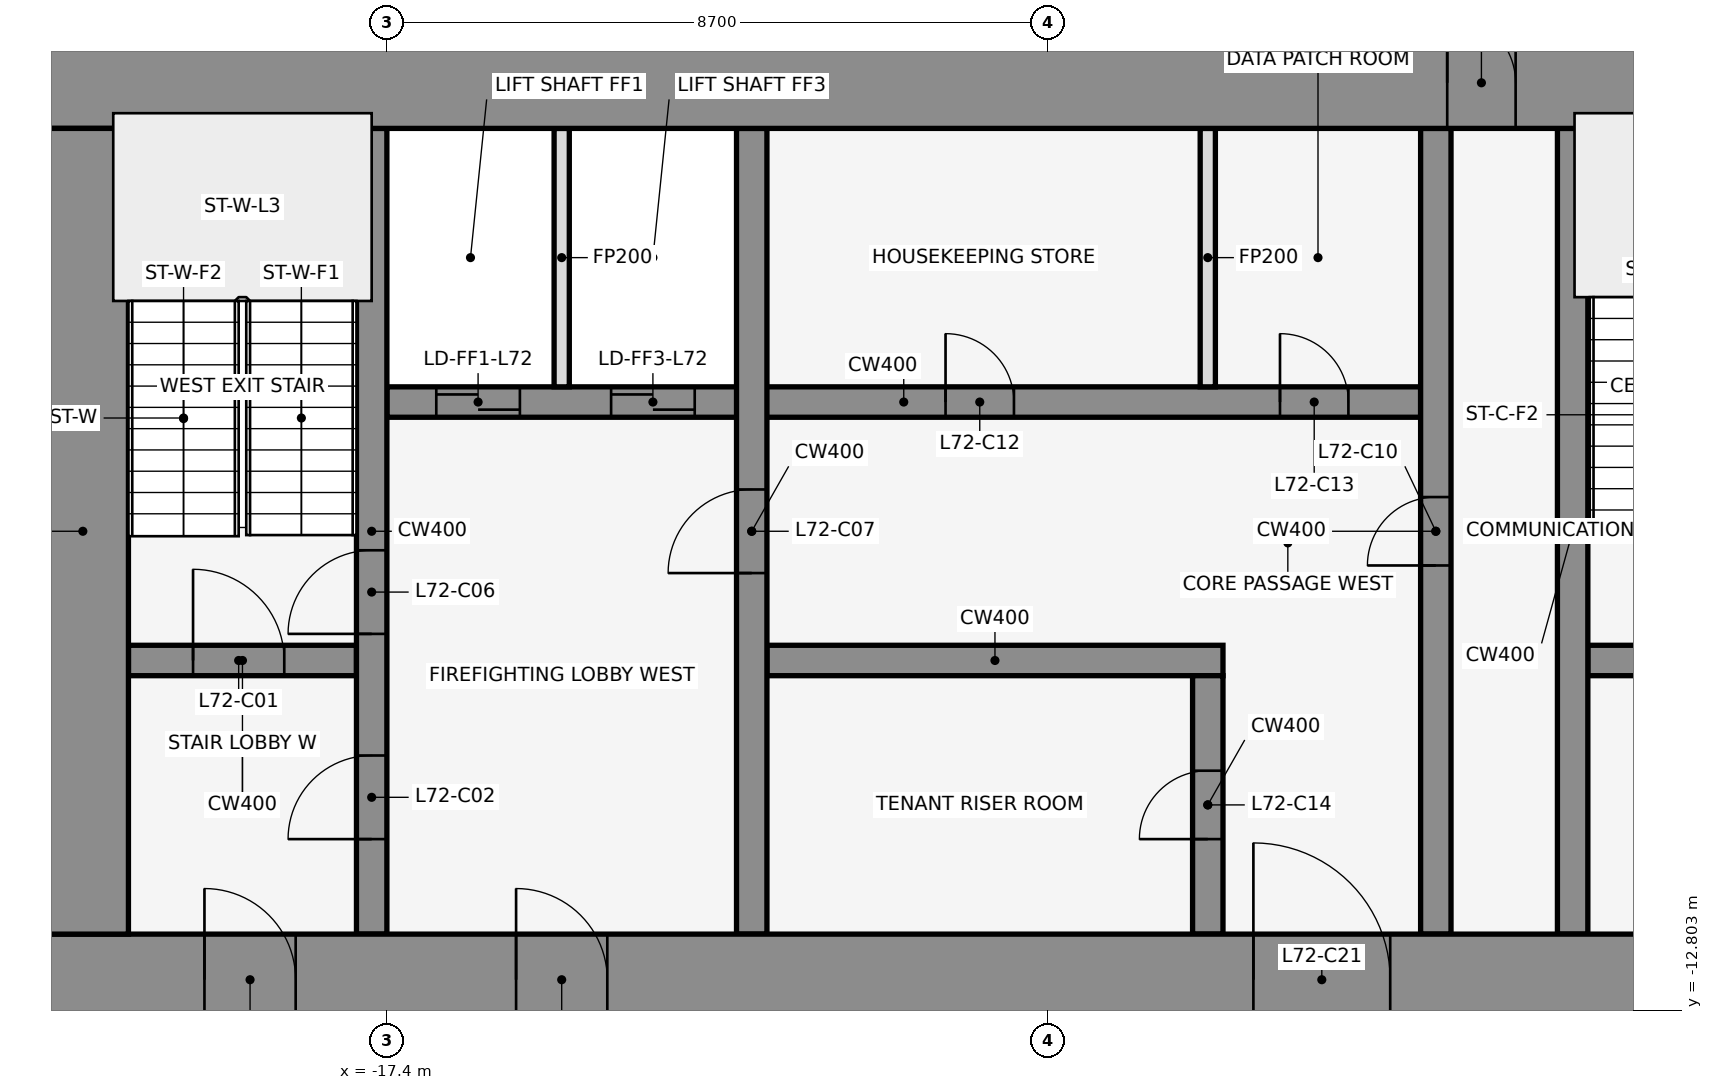
"""IFC4 building model, lengths in metres.
Left out: names, types, materials, properties, quantities, classifications, styles, units other than length and angle.
Written with IfcOpenShell. Run it as: python <this file> out.ifc"""

import sys

from ifc_helpers import new_model, si_unit, direction, frame, frame_2d, origin, place, context, subcontext, project, spatial, rectangle, extrude, element, fill, save


model = new_model("IFC4")
c1 = context("Model", 3, precision=1e-05, world=origin(), true_north=direction((0.0, 1.0)))
c2 = subcontext(c1, "Body", "Model", "MODEL_VIEW")
j1 = project(units=[si_unit("LENGTHUNIT", "METRE"), si_unit("PLANEANGLEUNIT", "RADIAN")], contexts=[c1])
p1 = place(None, origin())
s1 = spatial("IfcSite", under=j1, at=p1, CompositionType="ELEMENT")
p2 = place(p1, origin())
s2 = spatial("IfcBuilding", under=s1, at=p2, CompositionType="ELEMENT")
p3 = place(p2, frame((0.0, 0.0, 320.0)))
s3 = spatial("IfcBuildingStorey", under=s2, at=p3, CompositionType="ELEMENT", Elevation=320.0)
for number, where, z_axis, x_axis in (
    (1, (-0.068, -0.105, 0.0), (0.0, 0.0, 1.0), (-0.84, 0.543, 0.0)),
    (2, (-14.599, 1.08, 0.0), (0.0, 0.0, 1.0), (-0.84, -0.543, 0.0)),
):
    element("IfcWall", number, at=place(p3, frame(where, z_axis=z_axis, x_axis=x_axis)), inside=s3, PredefinedType="STANDARD", context=c2, shape_type="SweptSolid", body=[
        extrude(rectangle(XDim=2.183, YDim=0.25, at=frame_2d((1.091, 0.0))), origin(), (0.0, 0.0, 1.0), 4.35),
    ])
p4 = place(p3, frame((-20.8, -8.2, 0.0), z_axis=(0.0, 0.0, 1.0), x_axis=(1.0, 0.0, 0.0)))
e3 = element("IfcWall", 3, at=p4, inside=s3, PredefinedType="SHEAR", context=c2, shape_type="SweptSolid", body=[
    extrude(rectangle(XDim=3.0, YDim=0.4, at=frame_2d((1.5, 0.0))), origin(), (0.0, 0.0, 1.0), 4.5),
])
p5 = place(p4, frame((0.85, 0.0, 0.0)))
e4 = element("IfcOpeningElement", 4, at=p5, cuts=e3, PredefinedType="OPENING", context=c2, shape_type="SweptSolid", body=[
    extrude(rectangle(XDim=1.2, YDim=2.1, at=frame_2d((0.6, 1.05))), frame((0.0, 0.212, 0.0), z_axis=(0.0, -1.0, 0.0), x_axis=(1.0, 0.0, 0.0)), (0.0, 0.0, 1.0), 0.424),
])
p6 = place(p3, frame((-12.4, -8.2, 0.0), z_axis=(0.0, 0.0, 1.0), x_axis=(1.0, 0.0, 0.0)))
e5 = element("IfcWall", 5, at=p6, inside=s3, PredefinedType="SHEAR", context=c2, shape_type="SweptSolid", body=[
    extrude(rectangle(XDim=6.0, YDim=0.4, at=frame_2d((3.0, 0.0))), origin(), (0.0, 0.0, 1.0), 4.5),
])
p7 = place(p3, frame((-1.6, -8.2, 0.0), z_axis=(0.0, 0.0, 1.0), x_axis=(1.0, 0.0, 0.0)))
e6 = element("IfcWall", 6, at=p7, inside=s3, PredefinedType="SHEAR", context=c2, shape_type="SweptSolid", body=[
    extrude(rectangle(XDim=3.2, YDim=0.4, at=frame_2d((1.6, 0.0))), origin(), (0.0, 0.0, 1.0), 4.5),
])
p8 = place(p7, frame((1.05, 0.0, 0.0)))
e7 = element("IfcOpeningElement", 7, at=p8, cuts=e6, PredefinedType="OPENING", context=c2, shape_type="SweptSolid", body=[
    extrude(rectangle(XDim=1.2, YDim=2.1, at=frame_2d((0.6, 1.05))), frame((0.0, 0.212, 0.0), z_axis=(0.0, -1.0, 0.0), x_axis=(1.0, 0.0, 0.0)), (0.0, 0.0, 1.0), 0.424),
])
p9 = place(p3, frame((-17.4, -4.8, 0.0), z_axis=(0.0, 0.0, 1.0), x_axis=(1.0, 0.0, 0.0)))
e8 = element("IfcWall", 8, at=p9, inside=s3, PredefinedType="SHEAR", context=c2, shape_type="SweptSolid", body=[
    extrude(rectangle(XDim=13.6, YDim=0.4, at=frame_2d((6.8, 0.0))), origin(), (0.0, 0.0, 1.0), 4.5),
])
p10 = place(p9, frame((0.65, 0.0, 0.0)))
e9 = element("IfcOpeningElement", 9, at=p10, cuts=e8, PredefinedType="OPENING", context=c2, shape_type="SweptSolid", body=[
    extrude(rectangle(XDim=1.1, YDim=2.1, at=frame_2d((0.55, 1.05))), frame((0.0, 0.212, 0.0), z_axis=(0.0, -1.0, 0.0), x_axis=(1.0, 0.0, 0.0)), (0.0, 0.0, 1.0), 0.424),
])
p11 = place(p9, frame((2.95, 0.0, 0.0)))
e10 = element("IfcOpeningElement", 10, at=p11, cuts=e8, PredefinedType="OPENING", context=c2, shape_type="SweptSolid", body=[
    extrude(rectangle(XDim=1.1, YDim=2.1, at=frame_2d((0.55, 1.05))), frame((0.0, 0.212, 0.0), z_axis=(0.0, -1.0, 0.0), x_axis=(1.0, 0.0, 0.0)), (0.0, 0.0, 1.0), 0.424),
])
p12 = place(p9, frame((7.35, 0.0, 0.0)))
e11 = element("IfcOpeningElement", 11, at=p12, cuts=e8, PredefinedType="OPENING", context=c2, shape_type="SweptSolid", body=[
    extrude(rectangle(XDim=0.9, YDim=2.1, at=frame_2d((0.45, 1.05))), frame((0.0, 0.212, 0.0), z_axis=(0.0, -1.0, 0.0), x_axis=(1.0, 0.0, 0.0)), (0.0, 0.0, 1.0), 0.424),
])
p13 = place(p9, frame((11.75, 0.0, 0.0)))
e12 = element("IfcOpeningElement", 12, at=p13, cuts=e8, PredefinedType="OPENING", context=c2, shape_type="SweptSolid", body=[
    extrude(rectangle(XDim=0.9, YDim=2.1, at=frame_2d((0.45, 1.05))), frame((0.0, 0.212, 0.0), z_axis=(0.0, -1.0, 0.0), x_axis=(1.0, 0.0, 0.0)), (0.0, 0.0, 1.0), 0.424),
])
p14 = place(p3, frame((-17.6, -11.8, 0.0), z_axis=(0.0, 0.0, 1.0), x_axis=(0.0, 1.0, 0.0)))
e13 = element("IfcWall", 13, at=p14, inside=s3, PredefinedType="SHEAR", context=c2, shape_type="SweptSolid", body=[
    extrude(rectangle(XDim=10.6, YDim=0.4, at=frame_2d((5.3, 0.0))), origin(), (0.0, 0.0, 1.0), 4.5),
])
p15 = place(p14, frame((1.25, 0.0, 0.0)))
e14 = element("IfcOpeningElement", 14, at=p15, cuts=e13, PredefinedType="OPENING", context=c2, shape_type="SweptSolid", body=[
    extrude(rectangle(XDim=1.1, YDim=2.1, at=frame_2d((0.55, 1.05))), frame((0.0, 0.212, 0.0), z_axis=(0.0, -1.0, 0.0), x_axis=(1.0, 0.0, 0.0)), (0.0, 0.0, 1.0), 0.424),
])
p16 = place(p14, frame((3.95, 0.0, 0.0)))
e15 = element("IfcOpeningElement", 15, at=p16, cuts=e13, PredefinedType="OPENING", context=c2, shape_type="SweptSolid", body=[
    extrude(rectangle(XDim=1.1, YDim=2.1, at=frame_2d((0.55, 1.05))), frame((0.0, 0.212, 0.0), z_axis=(0.0, -1.0, 0.0), x_axis=(1.0, 0.0, 0.0)), (0.0, 0.0, 1.0), 0.424),
])
p17 = place(p3, frame((-15.1, -4.6, 0.0), z_axis=(0.0, 0.0, 1.0), x_axis=(0.0, 1.0, 0.0)))
e16 = element("IfcWall", 16, at=p17, inside=s3, PredefinedType="PARTITIONING", context=c2, shape_type="SweptSolid", body=[
    extrude(rectangle(XDim=3.4, YDim=0.2, at=frame_2d((1.7, 0.0))), origin(), (0.0, 0.0, 1.0), 3.418),
])
p18 = place(p3, frame((-12.6, -11.8, 0.0), z_axis=(0.0, 0.0, 1.0), x_axis=(0.0, 1.0, 0.0)))
e17 = element("IfcWall", 17, at=p18, inside=s3, PredefinedType="SHEAR", context=c2, shape_type="SweptSolid", body=[
    extrude(rectangle(XDim=10.6, YDim=0.4, at=frame_2d((5.3, 0.0))), origin(), (0.0, 0.0, 1.0), 4.5),
])
p19 = place(p18, frame((4.75, 0.0, 0.0)))
e18 = element("IfcOpeningElement", 18, at=p19, cuts=e17, PredefinedType="OPENING", context=c2, shape_type="SweptSolid", body=[
    extrude(rectangle(XDim=1.1, YDim=2.1, at=frame_2d((0.55, 1.05))), frame((0.0, 0.212, 0.0), z_axis=(0.0, -1.0, 0.0), x_axis=(1.0, 0.0, 0.0)), (0.0, 0.0, 1.0), 0.424),
])
p20 = place(p3, frame((-6.6, -11.8, 0.0), z_axis=(0.0, 0.0, 1.0), x_axis=(0.0, 1.0, 0.0)))
e19 = element("IfcWall", 19, at=p20, inside=s3, PredefinedType="SHEAR", context=c2, shape_type="SweptSolid", body=[
    extrude(rectangle(XDim=3.4, YDim=0.4, at=frame_2d((1.7, 0.0))), origin(), (0.0, 0.0, 1.0), 4.5),
])
p21 = place(p20, frame((1.25, 0.0, 0.0)))
e20 = element("IfcOpeningElement", 20, at=p21, cuts=e19, PredefinedType="OPENING", context=c2, shape_type="SweptSolid", body=[
    extrude(rectangle(XDim=0.9, YDim=2.1, at=frame_2d((0.45, 1.05))), frame((0.0, 0.212, 0.0), z_axis=(0.0, -1.0, 0.0), x_axis=(1.0, 0.0, 0.0)), (0.0, 0.0, 1.0), 0.424),
])
p22 = place(p3, frame((-6.6, -4.6, 0.0), z_axis=(0.0, 0.0, 1.0), x_axis=(0.0, 1.0, 0.0)))
e21 = element("IfcWall", 21, at=p22, inside=s3, PredefinedType="PARTITIONING", context=c2, shape_type="SweptSolid", body=[
    extrude(rectangle(XDim=3.4, YDim=0.2, at=frame_2d((1.7, 0.0))), origin(), (0.0, 0.0, 1.0), 3.418),
])
p23 = place(p3, frame((-3.6, -11.8, 0.0), z_axis=(0.0, 0.0, 1.0), x_axis=(0.0, 1.0, 0.0)))
e22 = element("IfcWall", 22, at=p23, inside=s3, PredefinedType="SHEAR", context=c2, shape_type="SweptSolid", body=[
    extrude(rectangle(XDim=10.6, YDim=0.4, at=frame_2d((5.3, 0.0))), origin(), (0.0, 0.0, 1.0), 4.5),
])
p24 = place(p23, frame((4.85, 0.0, 0.0)))
e23 = element("IfcOpeningElement", 23, at=p24, cuts=e22, PredefinedType="OPENING", context=c2, shape_type="SweptSolid", body=[
    extrude(rectangle(XDim=0.9, YDim=2.1, at=frame_2d((0.45, 1.05))), frame((0.0, 0.212, 0.0), z_axis=(0.0, -1.0, 0.0), x_axis=(1.0, 0.0, 0.0)), (0.0, 0.0, 1.0), 0.424),
])
p25 = place(p3, frame((-1.8, -11.8, 0.0), z_axis=(0.0, 0.0, 1.0), x_axis=(0.0, 1.0, 0.0)))
e24 = element("IfcWall", 24, at=p25, inside=s3, PredefinedType="SHEAR", context=c2, shape_type="SweptSolid", body=[
    extrude(rectangle(XDim=10.6, YDim=0.4, at=frame_2d((5.3, 0.0))), origin(), (0.0, 0.0, 1.0), 4.5),
])
p26 = place(p3, frame((-22.0, -0.6, 0.0), z_axis=(0.0, 0.0, 1.0), x_axis=(1.0, 0.0, 0.0)))
e25 = element("IfcWall", 25, at=p26, inside=s3, PredefinedType="SHEAR", context=c2, shape_type="SweptSolid", body=[
    extrude(rectangle(XDim=44.0, YDim=1.2, at=frame_2d((22.0, 0.0))), origin(), (0.0, 0.0, 1.0), 4.5),
])
p27 = place(p26, frame((18.55, 0.0, 0.0)))
e26 = element("IfcOpeningElement", 26, at=p27, cuts=e25, PredefinedType="OPENING", context=c2, shape_type="SweptSolid", body=[
    extrude(rectangle(XDim=0.9, YDim=2.1, at=frame_2d((0.45, 1.05))), frame((0.0, 0.612, 0.0), z_axis=(0.0, -1.0, 0.0), x_axis=(1.0, 0.0, 0.0)), (0.0, 0.0, 1.0), 1.224),
])
p28 = place(p26, frame((24.55, 0.0, 0.0)))
e27 = element("IfcOpeningElement", 27, at=p28, cuts=e25, PredefinedType="OPENING", context=c2, shape_type="SweptSolid", body=[
    extrude(rectangle(XDim=0.9, YDim=2.1, at=frame_2d((0.45, 1.05))), frame((0.0, 0.612, 0.0), z_axis=(0.0, -1.0, 0.0), x_axis=(1.0, 0.0, 0.0)), (0.0, 0.0, 1.0), 1.224),
])
p29 = place(p3, frame((-22.0, -12.4, 0.0), z_axis=(0.0, 0.0, 1.0), x_axis=(1.0, 0.0, 0.0)))
e28 = element("IfcWall", 28, at=p29, inside=s3, PredefinedType="SHEAR", context=c2, shape_type="SweptSolid", body=[
    extrude(rectangle(XDim=44.0, YDim=1.2, at=frame_2d((22.0, 0.0))), origin(), (0.0, 0.0, 1.0), 4.5),
])
p30 = place(p29, frame((2.2, 0.0, 0.0)))
e29 = element("IfcOpeningElement", 29, at=p30, cuts=e28, PredefinedType="OPENING", context=c2, shape_type="SweptSolid", body=[
    extrude(rectangle(XDim=1.2, YDim=2.1, at=frame_2d((0.6, 1.05))), frame((0.0, 0.612, 0.0), z_axis=(0.0, -1.0, 0.0), x_axis=(1.0, 0.0, 0.0)), (0.0, 0.0, 1.0), 1.224),
])
p31 = place(p29, frame((21.4, 0.0, 0.0)))
e30 = element("IfcOpeningElement", 30, at=p31, cuts=e28, PredefinedType="OPENING", context=c2, shape_type="SweptSolid", body=[
    extrude(rectangle(XDim=1.2, YDim=2.1, at=frame_2d((0.6, 1.05))), frame((0.0, 0.612, 0.0), z_axis=(0.0, -1.0, 0.0), x_axis=(1.0, 0.0, 0.0)), (0.0, 0.0, 1.0), 1.224),
])
p32 = place(p29, frame((40.6, 0.0, 0.0)))
e31 = element("IfcOpeningElement", 31, at=p32, cuts=e28, PredefinedType="OPENING", context=c2, shape_type="SweptSolid", body=[
    extrude(rectangle(XDim=1.2, YDim=2.1, at=frame_2d((0.6, 1.05))), frame((0.0, 0.612, 0.0), z_axis=(0.0, -1.0, 0.0), x_axis=(1.0, 0.0, 0.0)), (0.0, 0.0, 1.0), 1.224),
])
p33 = place(p29, frame((16.0, 0.0, 0.0)))
e32 = element("IfcOpeningElement", 32, at=p33, cuts=e28, PredefinedType="OPENING", context=c2, shape_type="SweptSolid", body=[
    extrude(rectangle(XDim=1.8, YDim=2.1, at=frame_2d((0.9, 1.05))), frame((0.0, 0.612, 0.0), z_axis=(0.0, -1.0, 0.0), x_axis=(1.0, 0.0, 0.0)), (0.0, 0.0, 1.0), 1.224),
])
p34 = place(p29, frame((6.3, 0.0, 0.0)))
e33 = element("IfcOpeningElement", 33, at=p34, cuts=e28, PredefinedType="OPENING", context=c2, shape_type="SweptSolid", body=[
    extrude(rectangle(XDim=1.2, YDim=2.1, at=frame_2d((0.6, 1.05))), frame((0.0, 0.612, 0.0), z_axis=(0.0, -1.0, 0.0), x_axis=(1.0, 0.0, 0.0)), (0.0, 0.0, 1.0), 1.224),
])
p35 = place(p29, frame((26.2, 0.0, 0.0)))
e34 = element("IfcOpeningElement", 34, at=p35, cuts=e28, PredefinedType="OPENING", context=c2, shape_type="SweptSolid", body=[
    extrude(rectangle(XDim=1.8, YDim=2.1, at=frame_2d((0.9, 1.05))), frame((0.0, 0.612, 0.0), z_axis=(0.0, -1.0, 0.0), x_axis=(1.0, 0.0, 0.0)), (0.0, 0.0, 1.0), 1.224),
])
p36 = place(p29, frame((36.5, 0.0, 0.0)))
e35 = element("IfcOpeningElement", 35, at=p36, cuts=e28, PredefinedType="OPENING", context=c2, shape_type="SweptSolid", body=[
    extrude(rectangle(XDim=1.2, YDim=2.1, at=frame_2d((0.6, 1.05))), frame((0.0, 0.612, 0.0), z_axis=(0.0, -1.0, 0.0), x_axis=(1.0, 0.0, 0.0)), (0.0, 0.0, 1.0), 1.224),
])
p37 = place(p3, frame((-21.4, -11.8, 0.0), z_axis=(0.0, 0.0, 1.0), x_axis=(0.0, 1.0, 0.0)))
e36 = element("IfcWall", 36, at=p37, inside=s3, PredefinedType="SHEAR", context=c2, shape_type="SweptSolid", body=[
    extrude(rectangle(XDim=10.6, YDim=1.2, at=frame_2d((5.3, 0.0))), origin(), (0.0, 0.0, 1.0), 4.5),
])
p38 = place(p5, origin())
e37 = element("IfcDoor", 37, at=p38, inside=s3, OperationType="SINGLE_SWING_LEFT", PredefinedType="DOOR", context=c2, shape_type="SweptSolid", body=[
    extrude(rectangle(XDim=1.2, YDim=2.1, at=frame_2d((0.6, 1.05))), frame((0.0, 0.025, 0.0), z_axis=(0.0, -1.0, 0.0), x_axis=(1.0, 0.0, 0.0)), (0.0, 0.0, 1.0), 0.05),
])
fill(e4, e37)
p39 = place(p15, frame((1.1, 0.0, 0.0), z_axis=(0.0, 0.0, 1.0), x_axis=(-1.0, 0.0, 0.0)))
e38 = element("IfcDoor", 38, at=p39, inside=s3, OperationType="SINGLE_SWING_LEFT", PredefinedType="DOOR", context=c2, shape_type="SweptSolid", body=[
    extrude(rectangle(XDim=1.1, YDim=2.1, at=frame_2d((0.55, 1.05))), frame((0.0, 0.025, 0.0), z_axis=(0.0, -1.0, 0.0), x_axis=(1.0, 0.0, 0.0)), (0.0, 0.0, 1.0), 0.05),
])
fill(e14, e38)
p40 = place(p10, origin())
e39 = element("IfcDoor", 39, at=p40, inside=s3, OperationType="DOUBLE_DOOR_SLIDING", PredefinedType="DOOR", context=c2, shape_type="SweptSolid", body=[
    extrude(rectangle(XDim=1.1, YDim=2.1, at=frame_2d((0.55, 1.05))), frame((0.0, 0.025, 0.0), z_axis=(0.0, -1.0, 0.0), x_axis=(1.0, 0.0, 0.0)), (0.0, 0.0, 1.0), 0.05),
])
fill(e9, e39)
p41 = place(p11, origin())
e40 = element("IfcDoor", 40, at=p41, inside=s3, OperationType="DOUBLE_DOOR_SLIDING", PredefinedType="DOOR", context=c2, shape_type="SweptSolid", body=[
    extrude(rectangle(XDim=1.1, YDim=2.1, at=frame_2d((0.55, 1.05))), frame((0.0, 0.025, 0.0), z_axis=(0.0, -1.0, 0.0), x_axis=(1.0, 0.0, 0.0)), (0.0, 0.0, 1.0), 0.05),
])
fill(e10, e40)
p42 = place(p16, frame((1.1, 0.0, 0.0), z_axis=(0.0, 0.0, 1.0), x_axis=(-1.0, 0.0, 0.0)))
e41 = element("IfcDoor", 41, at=p42, inside=s3, OperationType="SINGLE_SWING_LEFT", PredefinedType="DOOR", context=c2, shape_type="SweptSolid", body=[
    extrude(rectangle(XDim=1.1, YDim=2.1, at=frame_2d((0.55, 1.05))), frame((0.0, 0.025, 0.0), z_axis=(0.0, -1.0, 0.0), x_axis=(1.0, 0.0, 0.0)), (0.0, 0.0, 1.0), 0.05),
])
fill(e15, e41)
p43 = place(p19, origin())
e42 = element("IfcDoor", 42, at=p43, inside=s3, OperationType="SINGLE_SWING_LEFT", PredefinedType="DOOR", context=c2, shape_type="SweptSolid", body=[
    extrude(rectangle(XDim=1.1, YDim=2.1, at=frame_2d((0.55, 1.05))), frame((0.0, 0.025, 0.0), z_axis=(0.0, -1.0, 0.0), x_axis=(1.0, 0.0, 0.0)), (0.0, 0.0, 1.0), 0.05),
])
fill(e18, e42)
p44 = place(p24, frame((0.9, 0.0, 0.0), z_axis=(0.0, 0.0, 1.0), x_axis=(-1.0, 0.0, 0.0)))
e43 = element("IfcDoor", 43, at=p44, inside=s3, OperationType="SINGLE_SWING_LEFT", PredefinedType="DOOR", context=c2, shape_type="SweptSolid", body=[
    extrude(rectangle(XDim=0.9, YDim=2.1, at=frame_2d((0.45, 1.05))), frame((0.0, 0.025, 0.0), z_axis=(0.0, -1.0, 0.0), x_axis=(1.0, 0.0, 0.0)), (0.0, 0.0, 1.0), 0.05),
])
fill(e23, e43)
p45 = place(p12, origin())
e44 = element("IfcDoor", 44, at=p45, inside=s3, OperationType="SINGLE_SWING_RIGHT", PredefinedType="DOOR", context=c2, shape_type="SweptSolid", body=[
    extrude(rectangle(XDim=0.9, YDim=2.1, at=frame_2d((0.45, 1.05))), frame((0.0, 0.025, 0.0), z_axis=(0.0, -1.0, 0.0), x_axis=(1.0, 0.0, 0.0)), (0.0, 0.0, 1.0), 0.05),
])
fill(e11, e44)
p46 = place(p13, origin())
e45 = element("IfcDoor", 45, at=p46, inside=s3, OperationType="SINGLE_SWING_LEFT", PredefinedType="DOOR", context=c2, shape_type="SweptSolid", body=[
    extrude(rectangle(XDim=0.9, YDim=2.1, at=frame_2d((0.45, 1.05))), frame((0.0, 0.025, 0.0), z_axis=(0.0, -1.0, 0.0), x_axis=(1.0, 0.0, 0.0)), (0.0, 0.0, 1.0), 0.05),
])
fill(e12, e45)
p47 = place(p21, origin())
e46 = element("IfcDoor", 46, at=p47, inside=s3, OperationType="SINGLE_SWING_RIGHT", PredefinedType="DOOR", context=c2, shape_type="SweptSolid", body=[
    extrude(rectangle(XDim=0.9, YDim=2.1, at=frame_2d((0.45, 1.05))), frame((0.0, 0.025, 0.0), z_axis=(0.0, -1.0, 0.0), x_axis=(1.0, 0.0, 0.0)), (0.0, 0.0, 1.0), 0.05),
])
fill(e20, e46)
p48 = place(p27, origin())
e47 = element("IfcDoor", 47, at=p48, inside=s3, OperationType="SINGLE_SWING_LEFT", PredefinedType="DOOR", context=c2, shape_type="SweptSolid", body=[
    extrude(rectangle(XDim=0.9, YDim=2.1, at=frame_2d((0.45, 1.05))), frame((0.0, 0.025, 0.0), z_axis=(0.0, -1.0, 0.0), x_axis=(1.0, 0.0, 0.0)), (0.0, 0.0, 1.0), 0.05),
])
fill(e26, e47)
p49 = place(p30, frame((1.2, 0.0, 0.0), z_axis=(0.0, 0.0, 1.0), x_axis=(-1.0, 0.0, 0.0)))
e48 = element("IfcDoor", 48, at=p49, inside=s3, OperationType="SINGLE_SWING_RIGHT", PredefinedType="DOOR", context=c2, shape_type="SweptSolid", body=[
    extrude(rectangle(XDim=1.2, YDim=2.1, at=frame_2d((0.6, 1.05))), frame((0.0, 0.025, 0.0), z_axis=(0.0, -1.0, 0.0), x_axis=(1.0, 0.0, 0.0)), (0.0, 0.0, 1.0), 0.05),
])
fill(e29, e48)
p50 = place(p33, origin())
e49 = element("IfcDoor", 49, at=p50, inside=s3, OperationType="SINGLE_SWING_LEFT", PredefinedType="DOOR", context=c2, shape_type="SweptSolid", body=[
    extrude(rectangle(XDim=1.8, YDim=2.1, at=frame_2d((0.9, 1.05))), frame((0.0, 0.025, 0.0), z_axis=(0.0, -1.0, 0.0), x_axis=(1.0, 0.0, 0.0)), (0.0, 0.0, 1.0), 0.05),
])
fill(e32, e49)
p51 = place(p34, frame((1.2, 0.0, 0.0), z_axis=(0.0, 0.0, 1.0), x_axis=(-1.0, 0.0, 0.0)))
e50 = element("IfcDoor", 50, at=p51, inside=s3, OperationType="SINGLE_SWING_RIGHT", PredefinedType="DOOR", context=c2, shape_type="SweptSolid", body=[
    extrude(rectangle(XDim=1.2, YDim=2.1, at=frame_2d((0.6, 1.05))), frame((0.0, 0.025, 0.0), z_axis=(0.0, -1.0, 0.0), x_axis=(1.0, 0.0, 0.0)), (0.0, 0.0, 1.0), 0.05),
])
fill(e33, e50)
save(model, sys.argv[1])
